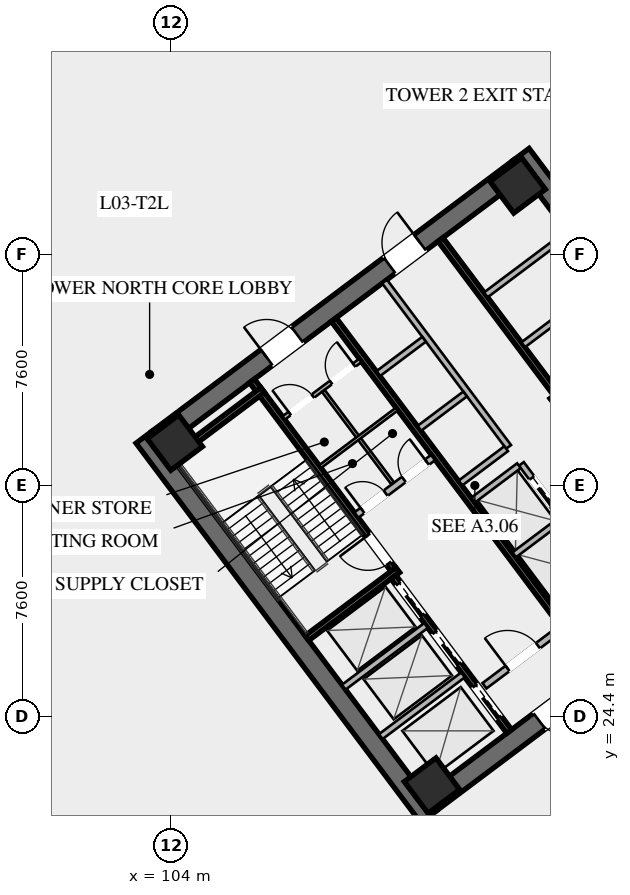
"""IFC4 building model, lengths in metres.
Left out: names, types, materials, properties, quantities, classifications, styles, units other than length and angle.
Written with IfcOpenShell. Run it as: python <this file> out.ifc"""

import sys

from ifc_helpers import new_model, si_unit, direction, frame, frame_2d, origin, origin_2d, place, context, subcontext, project, spatial, rectangle, hollow_rectangle, extrude, element, fill, save


model = new_model("IFC4")
c1 = context("Model", 3, precision=1e-05, world=origin(), true_north=direction((0.0, 1.0)))
c2 = subcontext(c1, "Body", "Model", "MODEL_VIEW")
j1 = project(units=[si_unit("LENGTHUNIT", "METRE"), si_unit("PLANEANGLEUNIT", "RADIAN")], contexts=[c1])
p1 = place(None, origin())
s1 = spatial("IfcSite", under=j1, at=p1, CompositionType="ELEMENT")
p2 = place(p1, origin())
s2 = spatial("IfcBuilding", under=s1, at=p2, CompositionType="ELEMENT")
p3 = place(p2, frame((0.0, 0.0, 15.6)))
s3 = spatial("IfcBuildingStorey", under=s2, at=p3, CompositionType="ELEMENT", Elevation=15.6)
for number, where, z_axis, x_axis in (
    (1, (112.476, 21.107, 0.0), (0.0, 0.0, 1.0), (-0.6, 0.8, 0.0)),
    (2, (115.524, 42.893, 0.0), (0.0, 0.0, 1.0), (0.6, -0.8, 0.0)),
):
    element("IfcWall", number, at=place(p3, frame(where, z_axis=z_axis, x_axis=x_axis)), inside=s3, PredefinedType="SHEAR", context=c2, shape_type="SweptSolid", body=[
        extrude(rectangle(XDim=15.6, YDim=0.65, at=frame_2d((7.8, 0.0))), origin(), (0.0, 0.0, 1.0), 4.2),
    ])
p4 = place(p3, frame((124.429, 30.478, 0.0), z_axis=(0.0, 0.0, 1.0), x_axis=(-0.799998028465, -0.600002628705, 0.0)))
e3 = element("IfcWall", 3, at=p4, inside=s3, PredefinedType="SHEAR", context=c2, shape_type="SweptSolid", body=[
    extrude(rectangle(XDim=14.86, YDim=0.65, at=frame_2d((7.43, 0.0))), origin(), (0.0, 0.0, 1.0), 4.2),
])
p5 = place(p4, frame((9.13, 0.0, 0.0)))
e4 = element("IfcOpeningElement", 4, at=p5, cuts=e3, PredefinedType="OPENING", context=c2, shape_type="SweptSolid", body=[
    extrude(rectangle(XDim=1.25, YDim=2.25, at=frame_2d((0.625, 1.125))), frame((0.0, 0.335, 0.0), z_axis=(0.0, -1.0, 0.0), x_axis=(1.0, 0.0, 0.0)), (0.0, 0.0, 1.0), 0.67),
])
p6 = place(p4, frame((4.08, 0.0, 0.0)))
e5 = element("IfcOpeningElement", 5, at=p6, cuts=e3, PredefinedType="OPENING", context=c2, shape_type="SweptSolid", body=[
    extrude(rectangle(XDim=1.25, YDim=2.25, at=frame_2d((0.625, 1.125))), frame((0.0, 0.335, 0.0), z_axis=(0.0, -1.0, 0.0), x_axis=(1.0, 0.0, 0.0)), (0.0, 0.0, 1.0), 0.67),
])
p7 = place(p3, frame((103.571, 33.522, 0.0), z_axis=(0.0, 0.0, 1.0), x_axis=(0.799998028465, 0.600002628705, 0.0)))
e6 = element("IfcWall", 6, at=p7, inside=s3, PredefinedType="SHEAR", context=c2, shape_type="SweptSolid", body=[
    extrude(rectangle(XDim=14.86, YDim=0.65, at=frame_2d((7.43, 0.0))), origin(), (0.0, 0.0, 1.0), 4.2),
])
p8 = place(p7, frame((4.48, 0.0, 0.0)))
e7 = element("IfcOpeningElement", 7, at=p8, cuts=e6, PredefinedType="OPENING", context=c2, shape_type="SweptSolid", body=[
    extrude(rectangle(XDim=1.25, YDim=2.25, at=frame_2d((0.625, 1.125))), frame((0.0, 0.335, 0.0), z_axis=(0.0, -1.0, 0.0), x_axis=(1.0, 0.0, 0.0)), (0.0, 0.0, 1.0), 0.67),
])
p9 = place(p7, frame((9.53, 0.0, 0.0)))
e8 = element("IfcOpeningElement", 8, at=p9, cuts=e6, PredefinedType="OPENING", context=c2, shape_type="SweptSolid", body=[
    extrude(rectangle(XDim=1.25, YDim=2.25, at=frame_2d((0.625, 1.125))), frame((0.0, 0.335, 0.0), z_axis=(0.0, -1.0, 0.0), x_axis=(1.0, 0.0, 0.0)), (0.0, 0.0, 1.0), 0.67),
])
for number, where, z_axis, x_axis in (
    (9, (112.59, 22.13, 0.0), (0.0, 0.0, 1.0), (0.8, 0.6, 0.0)),
    (10, (115.41, 41.87, 0.0), (0.0, 0.0, 1.0), (0.8, 0.6, 0.0)),
    (11, (104.13, 33.41, 0.0), (0.0, 0.0, 1.0), (0.8, 0.6, 0.0)),
):
    element("IfcColumn", number, at=place(p3, frame(where, z_axis=z_axis, x_axis=x_axis)), inside=s3, PredefinedType="COLUMN", context=c2, shape_type="SweptSolid", body=[
        extrude(hollow_rectangle(XDim=1.3, YDim=1.3, WallThickness=0.05, at=origin_2d()), origin(), (0.0, 0.0, 1.0), 3.9),
    ])
p10 = place(p3, frame((111.44, 29.08, 0.0), z_axis=(0.0, 0.0, 1.0), x_axis=(-0.600009827119, 0.799992629566, 0.0)))
e12 = element("IfcWall", 12, at=p10, inside=s3, PredefinedType="SHEAR", context=c2, shape_type="SweptSolid", body=[
    extrude(rectangle(XDim=7.95, YDim=0.2, at=frame_2d((3.975, 0.0))), origin(), (0.0, 0.0, 1.0), 3.9),
])
p11 = place(p10, frame((0.45, 0.0, 0.0)))
e13 = element("IfcOpeningElement", 13, at=p11, cuts=e12, PredefinedType="OPENING", context=c2, shape_type="SweptSolid", body=[
    extrude(rectangle(XDim=1.15, YDim=2.2, at=frame_2d((0.575, 1.1))), frame((0.0, 0.11, 0.0), z_axis=(0.0, -1.0, 0.0), x_axis=(1.0, 0.0, 0.0)), (0.0, 0.0, 1.0), 0.22),
])
for number, where, z_axis, x_axis in (
    (14, (108.476, 26.982, 0.0), (0.0, 0.0, 1.0), (0.8, 0.6, 0.0)),
    (15, (104.036, 32.902, 0.0), (0.0, 0.0, 1.0), (0.8, 0.6, 0.0)),
):
    element("IfcWall", number, at=place(p3, frame(where, z_axis=z_axis, x_axis=x_axis)), inside=s3, PredefinedType="SHEAR", context=c2, shape_type="SweptSolid", body=[
        extrude(rectangle(XDim=3.73, YDim=0.2, at=frame_2d((1.865, 0.0))), origin(), (0.0, 0.0, 1.0), 3.9),
    ])
p12 = place(p3, frame((116.56, 34.92, 0.0), z_axis=(0.0, 0.0, 1.0), x_axis=(0.600009827119, -0.799992629566, 0.0)))
e16 = element("IfcWall", 16, at=p12, inside=s3, PredefinedType="SHEAR", context=c2, shape_type="SweptSolid", body=[
    extrude(rectangle(XDim=7.95, YDim=0.2, at=frame_2d((3.975, 0.0))), origin(), (0.0, 0.0, 1.0), 3.9),
])
p13 = place(p12, frame((0.45, 0.0, 0.0)))
e17 = element("IfcOpeningElement", 17, at=p13, cuts=e16, PredefinedType="OPENING", context=c2, shape_type="SweptSolid", body=[
    extrude(rectangle(XDim=1.15, YDim=2.2, at=frame_2d((0.575, 1.1))), frame((0.0, 0.11, 0.0), z_axis=(0.0, -1.0, 0.0), x_axis=(1.0, 0.0, 0.0)), (0.0, 0.0, 1.0), 0.22),
])
p14 = place(p3, frame((116.54, 34.78, 0.0), z_axis=(0.0, 0.0, 1.0), x_axis=(0.799984290658, 0.600020945218, 0.0)))
e18 = element("IfcWall", 18, at=p14, inside=s3, PredefinedType="SHEAR", context=c2, shape_type="SweptSolid", body=[
    extrude(rectangle(XDim=3.73, YDim=0.2, at=frame_2d((1.865, 0.0))), origin(), (0.0, 0.0, 1.0), 3.9),
])
p15 = place(p3, frame((117.938, 26.016, 0.0), z_axis=(0.0, 0.0, 1.0), x_axis=(-0.600005463273, 0.799995902516, 0.0)))
e19 = element("IfcWall", 19, at=p15, inside=s3, PredefinedType="SHEAR", context=c2, shape_type="SweptSolid", body=[
    extrude(rectangle(XDim=14.3, YDim=0.2, at=frame_2d((7.15, 0.0))), origin(), (0.0, 0.0, 1.0), 3.9),
])
p16 = place(p3, frame((110.104, 31.028, 0.0), z_axis=(0.0, 0.0, 1.0), x_axis=(0.800018601094, 0.59997519774, 0.0)))
e20 = element("IfcWall", 20, at=p16, inside=s3, PredefinedType="SOLIDWALL", context=c2, shape_type="SweptSolid", body=[
    extrude(rectangle(XDim=3.15, YDim=0.22, at=frame_2d((1.575, 0.0))), origin(), (0.0, 0.0, 1.0), 2.943),
])
p17 = place(p16, frame((0.25, 0.0, 0.0)))
e21 = element("IfcOpeningElement", 21, at=p17, cuts=e20, PredefinedType="OPENING", context=c2, shape_type="SweptSolid", body=[
    extrude(rectangle(XDim=0.95, YDim=2.05, at=frame_2d((0.475, 1.025))), frame((0.0, 0.12, 0.0), z_axis=(0.0, -1.0, 0.0), x_axis=(1.0, 0.0, 0.0)), (0.0, 0.0, 1.0), 0.24),
])
p18 = place(p16, frame((1.95, 0.0, 0.0)))
e22 = element("IfcOpeningElement", 22, at=p18, cuts=e20, PredefinedType="OPENING", context=c2, shape_type="SweptSolid", body=[
    extrude(rectangle(XDim=0.95, YDim=2.05, at=frame_2d((0.475, 1.025))), frame((0.0, 0.12, 0.0), z_axis=(0.0, -1.0, 0.0), x_axis=(1.0, 0.0, 0.0)), (0.0, 0.0, 1.0), 0.24),
])
p19 = place(p3, frame((114.316, 25.412, 0.0), z_axis=(0.0, 0.0, 1.0), x_axis=(0.800018601094, 0.59997519774, 0.0)))
e23 = element("IfcWall", 23, at=p19, inside=s3, PredefinedType="SOLIDWALL", context=c2, shape_type="SweptSolid", body=[
    extrude(rectangle(XDim=3.15, YDim=0.22, at=frame_2d((1.575, 0.0))), origin(), (0.0, 0.0, 1.0), 2.943),
])
p20 = place(p19, frame((0.95, 0.0, 0.0)))
e24 = element("IfcOpeningElement", 24, at=p20, cuts=e23, PredefinedType="OPENING", context=c2, shape_type="SweptSolid", body=[
    extrude(rectangle(XDim=1.25, YDim=2.25, at=frame_2d((0.625, 1.125))), frame((0.0, 0.12, 0.0), z_axis=(0.0, -1.0, 0.0), x_axis=(1.0, 0.0, 0.0)), (0.0, 0.0, 1.0), 0.24),
])
p21 = place(p3, frame((115.13, 23.91, 0.0), z_axis=(0.0, 0.0, 1.0), x_axis=(-0.599975393228, 0.800018454488, 0.0)))
e25 = element("IfcWall", 25, at=p21, inside=s3, PredefinedType="SHEAR", context=c2, shape_type="SweptSolid", body=[
    extrude(rectangle(XDim=6.35, YDim=0.2, at=frame_2d((3.175, 0.0))), origin(), (0.0, 0.0, 1.0), 3.9),
])
p22 = place(p21, frame((4.775, 0.0, 0.0)))
e26 = element("IfcOpeningElement", 26, at=p22, cuts=e25, PredefinedType="OPENING", context=c2, shape_type="SweptSolid", body=[
    extrude(rectangle(XDim=1.3, YDim=2.25, at=frame_2d((0.65, 1.125))), frame((0.0, 0.11, 0.0), z_axis=(0.0, -1.0, 0.0), x_axis=(1.0, 0.0, 0.0)), (0.0, 0.0, 1.0), 0.22),
])
p23 = place(p21, frame((2.775, 0.0, 0.0)))
e27 = element("IfcOpeningElement", 27, at=p23, cuts=e25, PredefinedType="OPENING", context=c2, shape_type="SweptSolid", body=[
    extrude(rectangle(XDim=1.3, YDim=2.25, at=frame_2d((0.65, 1.125))), frame((0.0, 0.11, 0.0), z_axis=(0.0, -1.0, 0.0), x_axis=(1.0, 0.0, 0.0)), (0.0, 0.0, 1.0), 0.22),
])
p24 = place(p21, frame((0.575, 0.0, 0.0)))
e28 = element("IfcOpeningElement", 28, at=p24, cuts=e25, PredefinedType="OPENING", context=c2, shape_type="SweptSolid", body=[
    extrude(rectangle(XDim=1.3, YDim=2.25, at=frame_2d((0.65, 1.125))), frame((0.0, 0.11, 0.0), z_axis=(0.0, -1.0, 0.0), x_axis=(1.0, 0.0, 0.0)), (0.0, 0.0, 1.0), 0.22),
])
for number, where, z_axis, x_axis in (
    (29, (110.906, 23.742, 0.0), (0.0, 0.0, 1.0), (0.8, 0.6, 0.0)),
    (30, (109.688, 25.366, 0.0), (0.0, 0.0, 1.0), (0.8, 0.6, 0.0)),
):
    element("IfcWall", number, at=place(p3, frame(where, z_axis=z_axis, x_axis=x_axis)), inside=s3, PredefinedType="SOLIDWALL", context=c2, shape_type="SweptSolid", body=[
        extrude(rectangle(XDim=3.38, YDim=0.2, at=frame_2d((1.69, 0.0))), origin(), (0.0, 0.0, 1.0), 3.9),
    ])
p25 = place(p3, frame((112.87, 40.09, 0.0), z_axis=(0.0, 0.0, 1.0), x_axis=(0.599975393228, -0.800018454488, 0.0)))
e31 = element("IfcWall", 31, at=p25, inside=s3, PredefinedType="SHEAR", context=c2, shape_type="SweptSolid", body=[
    extrude(rectangle(XDim=6.35, YDim=0.2, at=frame_2d((3.175, 0.0))), origin(), (0.0, 0.0, 1.0), 3.9),
])
for number, where, z_axis, x_axis in (
    (32, (115.59, 36.63, 0.0), (0.0, 0.0, 1.0), (0.8, 0.6, 0.0)),
    (33, (114.36, 38.27, 0.0), (0.0, 0.0, 1.0), (0.8, 0.6, 0.0)),
):
    element("IfcWall", number, at=place(p3, frame(where, z_axis=z_axis, x_axis=x_axis)), inside=s3, PredefinedType="SOLIDWALL", context=c2, shape_type="SweptSolid", body=[
        extrude(rectangle(XDim=3.38, YDim=0.2, at=frame_2d((1.69, 0.0))), origin(), (0.0, 0.0, 1.0), 3.9),
    ])
p26 = place(p3, frame((107.71, 34.22, 0.0), z_axis=(0.0, 0.0, 1.0), x_axis=(0.799981399002, 0.60002480053, 0.0)))
e34 = element("IfcWall", 34, at=p26, inside=s3, PredefinedType="PARTITIONING", context=c2, shape_type="SweptSolid", body=[
    extrude(rectangle(XDim=3.15, YDim=0.135, at=frame_2d((1.575, 0.0))), origin(), (0.0, 0.0, 1.0), 2.943),
])
p27 = place(p26, frame((0.25, 0.0, 0.0)))
e35 = element("IfcOpeningElement", 35, at=p27, cuts=e34, PredefinedType="OPENING", context=c2, shape_type="SweptSolid", body=[
    extrude(rectangle(XDim=0.95, YDim=2.05, at=frame_2d((0.475, 1.025))), frame((0.0, 0.077, 0.0), z_axis=(0.0, -1.0, 0.0), x_axis=(1.0, 0.0, 0.0)), (0.0, 0.0, 1.0), 0.155),
])
p28 = place(p26, frame((1.95, 0.0, 0.0)))
e36 = element("IfcOpeningElement", 36, at=p28, cuts=e34, PredefinedType="OPENING", context=c2, shape_type="SweptSolid", body=[
    extrude(rectangle(XDim=0.95, YDim=2.05, at=frame_2d((0.475, 1.025))), frame((0.0, 0.077, 0.0), z_axis=(0.0, -1.0, 0.0), x_axis=(1.0, 0.0, 0.0)), (0.0, 0.0, 1.0), 0.155),
])
p29 = place(p3, frame((111.296, 32.072, 0.0), z_axis=(0.0, 0.0, 1.0), x_axis=(-0.59995887973, 0.800030838552, 0.0)))
e37 = element("IfcWall", 37, at=p29, inside=s3, PredefinedType="PARTITIONING", context=c2, shape_type="SweptSolid", body=[
    extrude(rectangle(XDim=3.8, YDim=0.11, at=frame_2d((1.9, 0.0))), origin(), (0.0, 0.0, 1.0), 2.943),
])
p30 = place(p3, frame((108.91, 32.62, 0.0), z_axis=(0.0, 0.0, 1.0), x_axis=(0.800018601094, 0.59997519774, 0.0)))
e38 = element("IfcWall", 38, at=p30, inside=s3, PredefinedType="PARTITIONING", context=c2, shape_type="SweptSolid", body=[
    extrude(rectangle(XDim=3.15, YDim=0.11, at=frame_2d((1.575, 0.0))), origin(), (0.0, 0.0, 1.0), 2.943),
])
p31 = place(p3, frame((119.61, 27.27, 0.0), z_axis=(0.0, 0.0, 1.0), x_axis=(-0.600011488909, 0.79999138319, 0.0)))
e39 = element("IfcWall", 39, at=p31, inside=s3, PredefinedType="SOLIDWALL", context=c2, shape_type="SweptSolid", body=[
    extrude(rectangle(XDim=6.8, YDim=0.2, at=frame_2d((3.4, 0.0))), origin(), (0.0, 0.0, 1.0), 3.9),
])
p32 = place(p31, frame((0.625, 0.0, 0.0)))
e40 = element("IfcOpeningElement", 40, at=p32, cuts=e39, PredefinedType="OPENING", context=c2, shape_type="SweptSolid", body=[
    extrude(rectangle(XDim=1.1, YDim=2.2, at=frame_2d((0.55, 1.1))), frame((0.0, 0.11, 0.0), z_axis=(0.0, -1.0, 0.0), x_axis=(1.0, 0.0, 0.0)), (0.0, 0.0, 1.0), 0.22),
])
p33 = place(p31, frame((2.875, 0.0, 0.0)))
e41 = element("IfcOpeningElement", 41, at=p33, cuts=e39, PredefinedType="OPENING", context=c2, shape_type="SweptSolid", body=[
    extrude(rectangle(XDim=1.1, YDim=2.2, at=frame_2d((0.55, 1.1))), frame((0.0, 0.11, 0.0), z_axis=(0.0, -1.0, 0.0), x_axis=(1.0, 0.0, 0.0)), (0.0, 0.0, 1.0), 0.22),
])
p34 = place(p31, frame((5.125, 0.0, 0.0)))
e42 = element("IfcOpeningElement", 42, at=p34, cuts=e39, PredefinedType="OPENING", context=c2, shape_type="SweptSolid", body=[
    extrude(rectangle(XDim=1.1, YDim=2.2, at=frame_2d((0.55, 1.1))), frame((0.0, 0.11, 0.0), z_axis=(0.0, -1.0, 0.0), x_axis=(1.0, 0.0, 0.0)), (0.0, 0.0, 1.0), 0.22),
])
p35 = place(p3, frame((115.296, 29.722, 0.0), z_axis=(0.0, 0.0, 1.0), x_axis=(0.799984418148, 0.600020775241, 0.0)))
e43 = element("IfcWall", 43, at=p35, inside=s3, PredefinedType="SOLIDWALL", context=c2, shape_type="SweptSolid", body=[
    extrude(rectangle(XDim=1.88, YDim=0.2, at=frame_2d((0.94, 0.0))), origin(), (0.0, 0.0, 1.0), 3.9),
])
p36 = place(p3, frame((113.946, 31.522, 0.0), z_axis=(0.0, 0.0, 1.0), x_axis=(0.8, 0.6, 0.0)))
e44 = element("IfcWall", 44, at=p36, inside=s3, PredefinedType="SOLIDWALL", context=c2, shape_type="SweptSolid", body=[
    extrude(rectangle(XDim=1.88, YDim=0.2, at=frame_2d((0.94, 0.0))), origin(), (0.0, 0.0, 1.0), 3.9),
])
p37 = place(p3, frame((115.11, 33.27, 0.0), z_axis=(0.0, 0.0, 1.0), x_axis=(-0.600011488909, 0.79999138319, 0.0)))
e45 = element("IfcWall", 45, at=p37, inside=s3, PredefinedType="SOLIDWALL", context=c2, shape_type="SweptSolid", body=[
    extrude(rectangle(XDim=6.8, YDim=0.2, at=frame_2d((3.4, 0.0))), origin(), (0.0, 0.0, 1.0), 3.9),
])
p38 = place(p3, frame((113.526, 32.082, 0.0), z_axis=(0.0, 0.0, 1.0), x_axis=(0.800046745961, 0.599937666993, 0.0)))
e46 = element("IfcWall", 46, at=p38, inside=s3, PredefinedType="SOLIDWALL", context=c2, shape_type="SweptSolid", body=[
    extrude(rectangle(XDim=1.88, YDim=0.2, at=frame_2d((0.94, 0.0))), origin(), (0.0, 0.0, 1.0), 3.9),
])
p39 = place(p3, frame((112.176, 33.882, 0.0), z_axis=(0.0, 0.0, 1.0), x_axis=(0.8, 0.6, 0.0)))
e47 = element("IfcWall", 47, at=p39, inside=s3, PredefinedType="SOLIDWALL", context=c2, shape_type="SweptSolid", body=[
    extrude(rectangle(XDim=1.88, YDim=0.2, at=frame_2d((0.94, 0.0))), origin(), (0.0, 0.0, 1.0), 3.9),
])
p40 = place(p3, frame((110.826, 35.682, 0.0), z_axis=(0.0, 0.0, 1.0), x_axis=(0.799984418148, 0.600020775241, 0.0)))
e48 = element("IfcWall", 48, at=p40, inside=s3, PredefinedType="SOLIDWALL", context=c2, shape_type="SweptSolid", body=[
    extrude(rectangle(XDim=1.88, YDim=0.2, at=frame_2d((0.94, 0.0))), origin(), (0.0, 0.0, 1.0), 3.9),
])
p41 = place(p8, origin())
e49 = element("IfcDoor", 49, at=p41, inside=s3, OperationType="SINGLE_SWING_LEFT", PredefinedType="DOOR", context=c2, shape_type="SweptSolid", body=[
    extrude(rectangle(XDim=1.25, YDim=2.25, at=frame_2d((0.625, 1.125))), frame((0.0, 0.025, 0.0), z_axis=(0.0, -1.0, 0.0), x_axis=(1.0, 0.0, 0.0)), (0.0, 0.0, 1.0), 0.05),
])
fill(e7, e49)
p42 = place(p9, origin())
e50 = element("IfcDoor", 50, at=p42, inside=s3, OperationType="SINGLE_SWING_RIGHT", PredefinedType="DOOR", context=c2, shape_type="SweptSolid", body=[
    extrude(rectangle(XDim=1.25, YDim=2.25, at=frame_2d((0.625, 1.125))), frame((0.0, 0.025, 0.0), z_axis=(0.0, -1.0, 0.0), x_axis=(1.0, 0.0, 0.0)), (0.0, 0.0, 1.0), 0.05),
])
fill(e8, e50)
p43 = place(p5, origin())
e51 = element("IfcDoor", 51, at=p43, inside=s3, OperationType="SINGLE_SWING_LEFT", PredefinedType="DOOR", context=c2, shape_type="SweptSolid", body=[
    extrude(rectangle(XDim=1.25, YDim=2.25, at=frame_2d((0.625, 1.125))), frame((0.0, 0.025, 0.0), z_axis=(0.0, -1.0, 0.0), x_axis=(1.0, 0.0, 0.0)), (0.0, 0.0, 1.0), 0.05),
])
fill(e4, e51)
p44 = place(p11, origin())
e52 = element("IfcDoor", 52, at=p44, inside=s3, OperationType="SINGLE_SWING_RIGHT", PredefinedType="DOOR", context=c2, shape_type="SweptSolid", body=[
    extrude(rectangle(XDim=1.15, YDim=2.2, at=frame_2d((0.575, 1.1))), frame((0.0, 0.025, 0.0), z_axis=(0.0, -1.0, 0.0), x_axis=(1.0, 0.0, 0.0)), (0.0, 0.0, 1.0), 0.05),
])
fill(e13, e52)
p45 = place(p20, origin())
e53 = element("IfcDoor", 53, at=p45, inside=s3, OperationType="SINGLE_SWING_LEFT", PredefinedType="DOOR", context=c2, shape_type="SweptSolid", body=[
    extrude(rectangle(XDim=1.25, YDim=2.25, at=frame_2d((0.625, 1.125))), frame((0.0, 0.025, 0.0), z_axis=(0.0, -1.0, 0.0), x_axis=(1.0, 0.0, 0.0)), (0.0, 0.0, 1.0), 0.05),
])
fill(e24, e53)
p46 = place(p27, origin())
e54 = element("IfcDoor", 54, at=p46, inside=s3, OperationType="SINGLE_SWING_LEFT", PredefinedType="DOOR", context=c2, shape_type="SweptSolid", body=[
    extrude(rectangle(XDim=0.95, YDim=2.05, at=frame_2d((0.475, 1.025))), frame((0.0, 0.025, 0.0), z_axis=(0.0, -1.0, 0.0), x_axis=(1.0, 0.0, 0.0)), (0.0, 0.0, 1.0), 0.05),
])
fill(e35, e54)
p47 = place(p28, origin())
e55 = element("IfcDoor", 55, at=p47, inside=s3, OperationType="SINGLE_SWING_RIGHT", PredefinedType="DOOR", context=c2, shape_type="SweptSolid", body=[
    extrude(rectangle(XDim=0.95, YDim=2.05, at=frame_2d((0.475, 1.025))), frame((0.0, 0.025, 0.0), z_axis=(0.0, -1.0, 0.0), x_axis=(1.0, 0.0, 0.0)), (0.0, 0.0, 1.0), 0.05),
])
fill(e36, e55)
p48 = place(p17, origin())
e56 = element("IfcDoor", 56, at=p48, inside=s3, OperationType="SINGLE_SWING_LEFT", PredefinedType="DOOR", context=c2, shape_type="SweptSolid", body=[
    extrude(rectangle(XDim=0.95, YDim=2.05, at=frame_2d((0.475, 1.025))), frame((0.0, 0.025, 0.0), z_axis=(0.0, -1.0, 0.0), x_axis=(1.0, 0.0, 0.0)), (0.0, 0.0, 1.0), 0.05),
])
fill(e21, e56)
p49 = place(p18, origin())
e57 = element("IfcDoor", 57, at=p49, inside=s3, OperationType="SINGLE_SWING_RIGHT", PredefinedType="DOOR", context=c2, shape_type="SweptSolid", body=[
    extrude(rectangle(XDim=0.95, YDim=2.05, at=frame_2d((0.475, 1.025))), frame((0.0, 0.025, 0.0), z_axis=(0.0, -1.0, 0.0), x_axis=(1.0, 0.0, 0.0)), (0.0, 0.0, 1.0), 0.05),
])
fill(e22, e57)
p50 = place(p22, origin())
e58 = element("IfcDoor", 58, at=p50, inside=s3, OperationType="SLIDING_TO_LEFT", PredefinedType="DOOR", context=c2, shape_type="SweptSolid", body=[
    extrude(rectangle(XDim=1.3, YDim=2.25, at=frame_2d((0.65, 1.125))), frame((0.0, 0.025, 0.0), z_axis=(0.0, -1.0, 0.0), x_axis=(1.0, 0.0, 0.0)), (0.0, 0.0, 1.0), 0.05),
])
fill(e26, e58)
p51 = place(p23, origin())
e59 = element("IfcDoor", 59, at=p51, inside=s3, OperationType="SLIDING_TO_LEFT", PredefinedType="DOOR", context=c2, shape_type="SweptSolid", body=[
    extrude(rectangle(XDim=1.3, YDim=2.25, at=frame_2d((0.65, 1.125))), frame((0.0, 0.025, 0.0), z_axis=(0.0, -1.0, 0.0), x_axis=(1.0, 0.0, 0.0)), (0.0, 0.0, 1.0), 0.05),
])
fill(e27, e59)
p52 = place(p24, origin())
e60 = element("IfcDoor", 60, at=p52, inside=s3, OperationType="SLIDING_TO_LEFT", PredefinedType="DOOR", context=c2, shape_type="SweptSolid", body=[
    extrude(rectangle(XDim=1.3, YDim=2.25, at=frame_2d((0.65, 1.125))), frame((0.0, 0.025, 0.0), z_axis=(0.0, -1.0, 0.0), x_axis=(1.0, 0.0, 0.0)), (0.0, 0.0, 1.0), 0.05),
])
fill(e28, e60)
p53 = place(p34, origin())
e61 = element("IfcDoor", 61, at=p53, inside=s3, OperationType="SLIDING_TO_LEFT", PredefinedType="DOOR", context=c2, shape_type="SweptSolid", body=[
    extrude(rectangle(XDim=1.1, YDim=2.2, at=frame_2d((0.55, 1.1))), frame((0.0, 0.025, 0.0), z_axis=(0.0, -1.0, 0.0), x_axis=(1.0, 0.0, 0.0)), (0.0, 0.0, 1.0), 0.05),
])
fill(e42, e61)
save(model, sys.argv[1])
